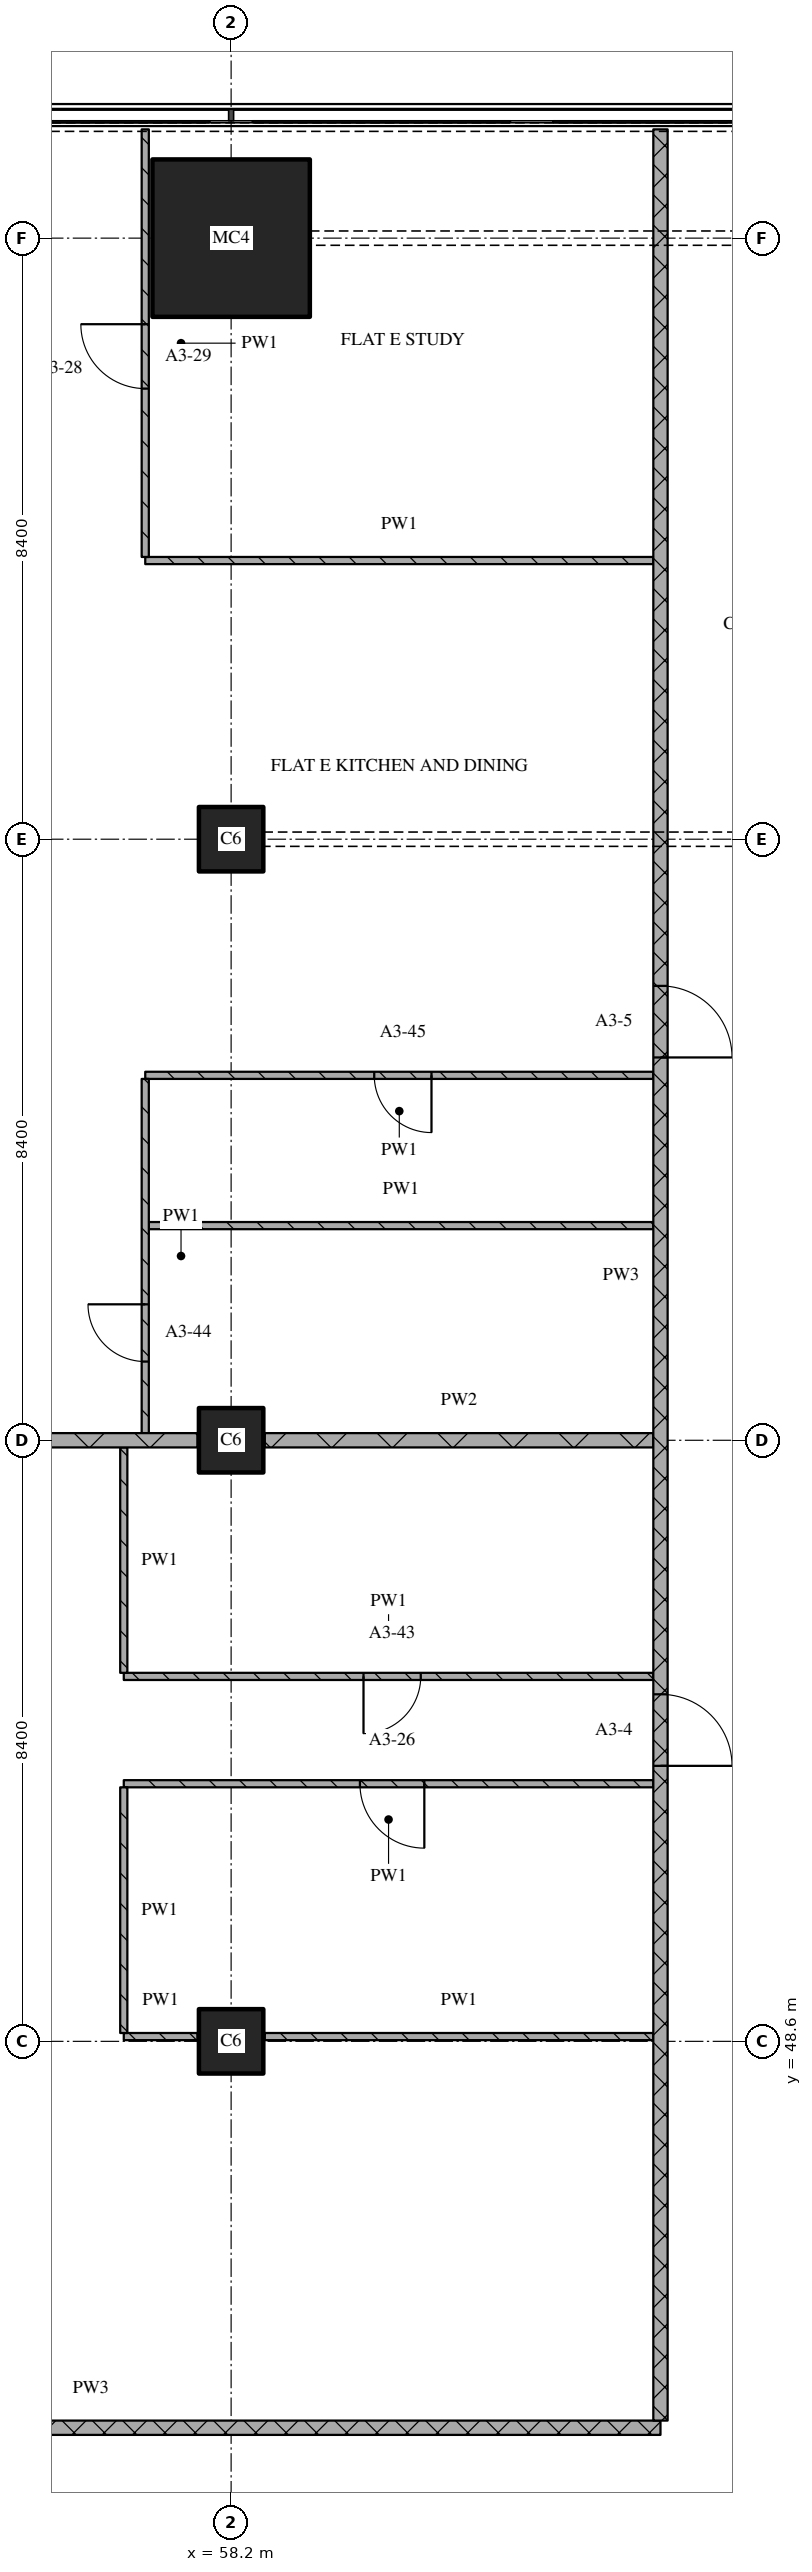
"""IFC4 building model, lengths in metres.
Left out: names, types, materials, properties, quantities, classifications, styles, units other than length and angle.
Written with IfcOpenShell. Run it as: python <this file> out.ifc"""

import sys

from ifc_helpers import new_model, si_unit, direction, frame, frame_2d, origin, origin_2d, place, context, subcontext, project, spatial, rectangle, extrude, element, fill, save


model = new_model("IFC4")
c1 = context("Model", 3, precision=1e-05, world=origin(), true_north=direction((0.0, 1.0)))
c2 = subcontext(c1, "Body", "Model", "MODEL_VIEW")
j1 = project(units=[si_unit("LENGTHUNIT", "METRE"), si_unit("PLANEANGLEUNIT", "RADIAN")], contexts=[c1])
p1 = place(None, origin())
s1 = spatial("IfcSite", under=j1, at=p1, CompositionType="ELEMENT")
p2 = place(p1, origin())
s2 = spatial("IfcBuilding", under=s1, at=p2, CompositionType="ELEMENT")
p3 = place(p2, frame((0.0, 0.0, 66.0)))
s3 = spatial("IfcBuildingStorey", under=s2, at=p3, CompositionType="ELEMENT", Elevation=66.0)
for number, where, z_axis, x_axis in (
    (1, (58.2, 48.6, 0.0), (0.0, 0.0, 1.0), (1.0, 0.0, 0.0)),
    (2, (58.2, 57.0, 0.0), (0.0, 0.0, 1.0), (1.0, 0.0, 0.0)),
    (3, (58.2, 65.4, 0.0), (0.0, 0.0, 1.0), (1.0, 0.0, 0.0)),
):
    element("IfcColumn", number, at=place(p3, frame(where, z_axis=z_axis, x_axis=x_axis)), inside=s3, PredefinedType="COLUMN", context=c2, shape_type="SweptSolid", body=[
        extrude(rectangle(XDim=0.9, YDim=0.9, at=origin_2d()), origin(), (0.0, 0.0, 1.0), 3.6),
    ])
p4 = place(p3, frame((58.2, 73.8, 0.0), z_axis=(0.0, 0.0, 1.0), x_axis=(1.0, 0.0, 0.0)))
e4 = element("IfcColumn", 4, at=p4, inside=s3, PredefinedType="COLUMN", context=c2, shape_type="SweptSolid", body=[
    extrude(rectangle(XDim=2.2, YDim=2.2, at=origin_2d()), origin(), (0.0, 0.0, 1.0), 3.6),
])
p5 = place(p3, frame((48.28, 43.2, 0.0), z_axis=(0.0, 0.0, 1.0), x_axis=(1.0, 0.0, 0.0)))
e5 = element("IfcWall", 5, at=p5, inside=s3, PredefinedType="PARTITIONING", context=c2, shape_type="SweptSolid", body=[
    extrude(rectangle(XDim=15.92, YDim=0.2, at=frame_2d((7.96, 0.0))), origin(), (0.0, 0.0, 1.0), 3.32),
])
p6 = place(p3, frame((56.7, 48.667, 0.0), z_axis=(0.0, 0.0, 1.0), x_axis=(1.0, 0.0, 0.0)))
e6 = element("IfcWall", 6, at=p6, inside=s3, PredefinedType="PARTITIONING", context=c2, shape_type="SweptSolid", body=[
    extrude(rectangle(XDim=1.03, YDim=0.1, at=frame_2d((0.515, 0.0))), origin(), (0.0, 0.0, 1.0), 3.32),
])
p7 = place(p3, frame((58.67, 48.667, 0.0), z_axis=(0.0, 0.0, 1.0), x_axis=(1.0, 0.0, 0.0)))
e7 = element("IfcWall", 7, at=p7, inside=s3, PredefinedType="PARTITIONING", context=c2, shape_type="SweptSolid", body=[
    extrude(rectangle(XDim=5.43, YDim=0.1, at=frame_2d((2.715, 0.0))), origin(), (0.0, 0.0, 1.0), 3.32),
])
p8 = place(p3, frame((64.1, 52.2, 0.0), z_axis=(0.0, 0.0, 1.0), x_axis=(-1.0, 0.0, 0.0)))
e8 = element("IfcWall", 8, at=p8, inside=s3, PredefinedType="PARTITIONING", context=c2, shape_type="SweptSolid", body=[
    extrude(rectangle(XDim=7.4, YDim=0.1, at=frame_2d((3.7, 0.0))), origin(), (0.0, 0.0, 1.0), 3.32),
])
p9 = place(p8, frame((3.2, 0.0, 0.0)))
e9 = element("IfcOpeningElement", 9, at=p9, cuts=e8, PredefinedType="OPENING", context=c2, shape_type="SweptSolid", body=[
    extrude(rectangle(XDim=0.9, YDim=2.1, at=frame_2d((0.45, 1.05))), frame((0.0, 0.06, 0.0), z_axis=(0.0, -1.0, 0.0), x_axis=(1.0, 0.0, 0.0)), (0.0, 0.0, 1.0), 0.12),
])
p10 = place(p3, frame((56.7, 53.7, 0.0), z_axis=(0.0, 0.0, 1.0), x_axis=(1.0, 0.0, 0.0)))
e10 = element("IfcWall", 10, at=p10, inside=s3, PredefinedType="PARTITIONING", context=c2, shape_type="SweptSolid", body=[
    extrude(rectangle(XDim=7.4, YDim=0.1, at=frame_2d((3.7, 0.0))), origin(), (0.0, 0.0, 1.0), 3.32),
])
p11 = place(p10, frame((3.35, 0.0, 0.0)))
e11 = element("IfcOpeningElement", 11, at=p11, cuts=e10, PredefinedType="OPENING", context=c2, shape_type="SweptSolid", body=[
    extrude(rectangle(XDim=0.8, YDim=2.1, at=frame_2d((0.4, 1.05))), frame((0.0, 0.06, 0.0), z_axis=(0.0, -1.0, 0.0), x_axis=(1.0, 0.0, 0.0)), (0.0, 0.0, 1.0), 0.12),
])
p12 = place(p3, frame((50.27, 57.0, 0.0), z_axis=(0.0, 0.0, 1.0), x_axis=(1.0, 0.0, 0.0)))
e12 = element("IfcWall", 12, at=p12, inside=s3, PredefinedType="PARTITIONING", context=c2, shape_type="SweptSolid", body=[
    extrude(rectangle(XDim=7.46, YDim=0.2, at=frame_2d((3.73, 0.0))), origin(), (0.0, 0.0, 1.0), 3.32),
])
p13 = place(p3, frame((58.67, 57.0, 0.0), z_axis=(0.0, 0.0, 1.0), x_axis=(1.0, 0.0, 0.0)))
e13 = element("IfcWall", 13, at=p13, inside=s3, PredefinedType="PARTITIONING", context=c2, shape_type="SweptSolid", body=[
    extrude(rectangle(XDim=5.43, YDim=0.2, at=frame_2d((2.715, 0.0))), origin(), (0.0, 0.0, 1.0), 3.32),
])
p14 = place(p3, frame((57.05, 60.0, 0.0), z_axis=(0.0, 0.0, 1.0), x_axis=(1.0, 0.0, 0.0)))
e14 = element("IfcWall", 14, at=p14, inside=s3, PredefinedType="PARTITIONING", context=c2, shape_type="SweptSolid", body=[
    extrude(rectangle(XDim=7.05, YDim=0.1, at=frame_2d((3.525, 0.0))), origin(), (0.0, 0.0, 1.0), 3.32),
])
p15 = place(p3, frame((64.1, 62.1, 0.0), z_axis=(0.0, 0.0, 1.0), x_axis=(-1.0, 0.0, 0.0)))
e15 = element("IfcWall", 15, at=p15, inside=s3, PredefinedType="PARTITIONING", context=c2, shape_type="SweptSolid", body=[
    extrude(rectangle(XDim=7.1, YDim=0.1, at=frame_2d((3.55, 0.0))), origin(), (0.0, 0.0, 1.0), 3.32),
])
p16 = place(p15, frame((3.1, 0.0, 0.0)))
e16 = element("IfcOpeningElement", 16, at=p16, cuts=e15, PredefinedType="OPENING", context=c2, shape_type="SweptSolid", body=[
    extrude(rectangle(XDim=0.8, YDim=2.1, at=frame_2d((0.4, 1.05))), frame((0.0, 0.06, 0.0), z_axis=(0.0, -1.0, 0.0), x_axis=(1.0, 0.0, 0.0)), (0.0, 0.0, 1.0), 0.12),
])
p17 = place(p3, frame((57.0, 69.294, 0.0), z_axis=(0.0, 0.0, 1.0), x_axis=(1.0, 0.0, 0.0)))
e17 = element("IfcWall", 17, at=p17, inside=s3, PredefinedType="PARTITIONING", context=c2, shape_type="SweptSolid", body=[
    extrude(rectangle(XDim=7.1, YDim=0.1, at=frame_2d((3.55, 0.0))), origin(), (0.0, 0.0, 1.0), 3.32),
])
p18 = place(p3, frame((56.7, 52.15, 0.0), z_axis=(0.0, 0.0, 1.0), x_axis=(0.0, -1.0, 0.0)))
e18 = element("IfcWall", 18, at=p18, inside=s3, PredefinedType="PARTITIONING", context=c2, shape_type="SweptSolid", body=[
    extrude(rectangle(XDim=3.433, YDim=0.1, at=frame_2d((1.717, 0.0))), origin(), (0.0, 0.0, 1.0), 3.32),
])
p19 = place(p3, frame((56.7, 56.9, 0.0), z_axis=(0.0, 0.0, 1.0), x_axis=(0.0, -1.0, 0.0)))
e19 = element("IfcWall", 19, at=p19, inside=s3, PredefinedType="PARTITIONING", context=c2, shape_type="SweptSolid", body=[
    extrude(rectangle(XDim=3.15, YDim=0.1, at=frame_2d((1.575, 0.0))), origin(), (0.0, 0.0, 1.0), 3.32),
])
p20 = place(p3, frame((57.0, 62.05, 0.0), z_axis=(0.0, 0.0, 1.0), x_axis=(0.0, -1.0, 0.0)))
e20 = element("IfcWall", 20, at=p20, inside=s3, PredefinedType="PARTITIONING", context=c2, shape_type="SweptSolid", body=[
    extrude(rectangle(XDim=4.95, YDim=0.1, at=frame_2d((2.475, 0.0))), origin(), (0.0, 0.0, 1.0), 3.32),
])
p21 = place(p20, frame((3.15, 0.0, 0.0)))
e21 = element("IfcOpeningElement", 21, at=p21, cuts=e20, PredefinedType="OPENING", context=c2, shape_type="SweptSolid", body=[
    extrude(rectangle(XDim=0.8, YDim=2.1, at=frame_2d((0.4, 1.05))), frame((0.0, 0.06, 0.0), z_axis=(0.0, -1.0, 0.0), x_axis=(1.0, 0.0, 0.0)), (0.0, 0.0, 1.0), 0.12),
])
p22 = place(p3, frame((57.0, 75.32, 0.0), z_axis=(0.0, 0.0, 1.0), x_axis=(0.0, -1.0, 0.0)))
e22 = element("IfcWall", 22, at=p22, inside=s3, PredefinedType="PARTITIONING", context=c2, shape_type="SweptSolid", body=[
    extrude(rectangle(XDim=5.976, YDim=0.1, at=frame_2d((2.988, 0.0))), origin(), (0.0, 0.0, 1.0), 3.32),
])
p23 = place(p22, frame((2.723, 0.0, 0.0)))
e23 = element("IfcOpeningElement", 23, at=p23, cuts=e22, PredefinedType="OPENING", context=c2, shape_type="SweptSolid", body=[
    extrude(rectangle(XDim=0.9, YDim=2.1, at=frame_2d((0.45, 1.05))), frame((0.0, 0.06, 0.0), z_axis=(0.0, -1.0, 0.0), x_axis=(1.0, 0.0, 0.0)), (0.0, 0.0, 1.0), 0.12),
])
p24 = place(p3, frame((64.2, 43.3, 0.0), z_axis=(0.0, 0.0, 1.0), x_axis=(0.0, 1.0, 0.0)))
e24 = element("IfcWall", 24, at=p24, inside=s3, PredefinedType="PARTITIONING", context=c2, shape_type="SweptSolid", body=[
    extrude(rectangle(XDim=32.02, YDim=0.2, at=frame_2d((16.01, 0.0))), origin(), (0.0, 0.0, 1.0), 3.32),
])
p25 = place(p24, frame((9.15, 0.0, 0.0)))
e25 = element("IfcOpeningElement", 25, at=p25, cuts=e24, PredefinedType="OPENING", context=c2, shape_type="SweptSolid", body=[
    extrude(rectangle(XDim=1.0, YDim=2.1, at=frame_2d((0.5, 1.05))), frame((0.0, 0.11, 0.0), z_axis=(0.0, -1.0, 0.0), x_axis=(1.0, 0.0, 0.0)), (0.0, 0.0, 1.0), 0.22),
])
p26 = place(p24, frame((19.05, 0.0, 0.0)))
e26 = element("IfcOpeningElement", 26, at=p26, cuts=e24, PredefinedType="OPENING", context=c2, shape_type="SweptSolid", body=[
    extrude(rectangle(XDim=1.0, YDim=2.1, at=frame_2d((0.5, 1.05))), frame((0.0, 0.11, 0.0), z_axis=(0.0, -1.0, 0.0), x_axis=(1.0, 0.0, 0.0)), (0.0, 0.0, 1.0), 0.22),
])
p27 = place(p9, origin())
e27 = element("IfcDoor", 27, at=p27, inside=s3, OperationType="SINGLE_SWING_LEFT", PredefinedType="DOOR", context=c2, shape_type="SweptSolid", body=[
    extrude(rectangle(XDim=0.9, YDim=2.1, at=frame_2d((0.45, 1.05))), frame((0.0, 0.025, 0.0), z_axis=(0.0, -1.0, 0.0), x_axis=(1.0, 0.0, 0.0)), (0.0, 0.0, 1.0), 0.05),
])
fill(e9, e27)
p28 = place(p11, origin())
e28 = element("IfcDoor", 28, at=p28, inside=s3, OperationType="SINGLE_SWING_RIGHT", PredefinedType="DOOR", context=c2, shape_type="SweptSolid", body=[
    extrude(rectangle(XDim=0.8, YDim=2.1, at=frame_2d((0.4, 1.05))), frame((0.0, 0.025, 0.0), z_axis=(0.0, -1.0, 0.0), x_axis=(1.0, 0.0, 0.0)), (0.0, 0.0, 1.0), 0.05),
])
fill(e11, e28)
p29 = place(p16, origin())
e29 = element("IfcDoor", 29, at=p29, inside=s3, OperationType="SINGLE_SWING_LEFT", PredefinedType="DOOR", context=c2, shape_type="SweptSolid", body=[
    extrude(rectangle(XDim=0.8, YDim=2.1, at=frame_2d((0.4, 1.05))), frame((0.0, 0.025, 0.0), z_axis=(0.0, -1.0, 0.0), x_axis=(1.0, 0.0, 0.0)), (0.0, 0.0, 1.0), 0.05),
])
fill(e16, e29)
p30 = place(p21, origin())
e30 = element("IfcDoor", 30, at=p30, inside=s3, OperationType="SINGLE_SWING_RIGHT", PredefinedType="DOOR", context=c2, shape_type="SweptSolid", body=[
    extrude(rectangle(XDim=0.8, YDim=2.1, at=frame_2d((0.4, 1.05))), frame((0.0, 0.025, 0.0), z_axis=(0.0, -1.0, 0.0), x_axis=(1.0, 0.0, 0.0)), (0.0, 0.0, 1.0), 0.05),
])
fill(e21, e30)
p31 = place(p23, origin())
e31 = element("IfcDoor", 31, at=p31, inside=s3, OperationType="SINGLE_SWING_RIGHT", PredefinedType="DOOR", context=c2, shape_type="SweptSolid", body=[
    extrude(rectangle(XDim=0.9, YDim=2.1, at=frame_2d((0.45, 1.05))), frame((0.0, 0.025, 0.0), z_axis=(0.0, -1.0, 0.0), x_axis=(1.0, 0.0, 0.0)), (0.0, 0.0, 1.0), 0.05),
])
fill(e23, e31)
p32 = place(p25, origin())
e32 = element("IfcDoor", 32, at=p32, inside=s3, OperationType="SINGLE_SWING_RIGHT", PredefinedType="DOOR", context=c2, shape_type="SweptSolid", body=[
    extrude(rectangle(XDim=1.0, YDim=2.1, at=frame_2d((0.5, 1.05))), frame((0.0, 0.025, 0.0), z_axis=(0.0, -1.0, 0.0), x_axis=(1.0, 0.0, 0.0)), (0.0, 0.0, 1.0), 0.05),
])
fill(e25, e32)
p33 = place(p26, origin())
e33 = element("IfcDoor", 33, at=p33, inside=s3, OperationType="SINGLE_SWING_RIGHT", PredefinedType="DOOR", context=c2, shape_type="SweptSolid", body=[
    extrude(rectangle(XDim=1.0, YDim=2.1, at=frame_2d((0.5, 1.05))), frame((0.0, 0.025, 0.0), z_axis=(0.0, -1.0, 0.0), x_axis=(1.0, 0.0, 0.0)), (0.0, 0.0, 1.0), 0.05),
])
fill(e26, e33)
save(model, sys.argv[1])
